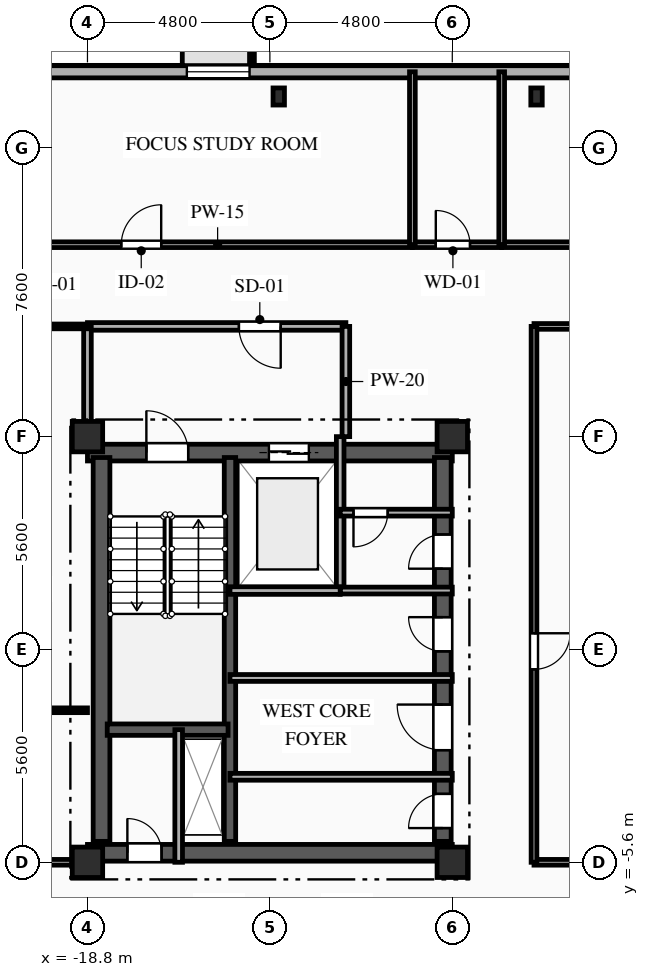
"""IFC4 building model, lengths in metres.
Left out: names, types, materials, properties, quantities, classifications, styles, units other than length and angle.
Written with IfcOpenShell. Run it as: python <this file> out.ifc"""

import sys

from ifc_helpers import new_model, si_unit, direction, frame, frame_2d, origin, origin_2d, place, context, subcontext, project, spatial, rectangle, i_section, extrude, element, fill, save


model = new_model("IFC4")
c1 = context("Model", 3, precision=1e-05, world=origin(), true_north=direction((0.0, 1.0)))
c2 = subcontext(c1, "Body", "Model", "MODEL_VIEW")
j1 = project(units=[si_unit("LENGTHUNIT", "METRE"), si_unit("PLANEANGLEUNIT", "RADIAN")], contexts=[c1])
p1 = place(None, origin())
s1 = spatial("IfcSite", under=j1, at=p1, CompositionType="ELEMENT")
p2 = place(p1, origin())
s2 = spatial("IfcBuilding", under=s1, at=p2, CompositionType="ELEMENT")
p3 = place(p2, frame((0.0, 0.0, 231.65)))
s3 = spatial("IfcBuildingStorey", under=s2, at=p3, CompositionType="ELEMENT", Elevation=231.65)
for number, where, z_axis, x_axis in (
    (1, (-18.8, -5.6, 0.0), (0.0, 0.0, 1.0), (1.0, 0.0, 0.0)),
    (2, (-18.8, 5.6, 0.0), (0.0, 0.0, 1.0), (1.0, 0.0, 0.0)),
    (3, (-9.2, -5.6, 0.0), (0.0, 0.0, 1.0), (1.0, 0.0, 0.0)),
    (4, (-9.2, 5.6, 0.0), (0.0, 0.0, 1.0), (1.0, 0.0, 0.0)),
):
    element("IfcColumn", number, at=place(p3, frame(where, z_axis=z_axis, x_axis=x_axis)), inside=s3, PredefinedType="COLUMN", context=c2, shape_type="SweptSolid", body=[
        extrude(rectangle(XDim=0.8, YDim=0.8, at=origin_2d()), origin(), (0.0, 0.0, 1.0), 3.35),
    ])
for number, where, z_axis, x_axis in (
    (5, (-6.983, 14.55, 0.0), (0.0, 0.0, 1.0), (1.0, 0.0, 0.0)),
    (6, (-13.767, 14.55, 0.0), (0.0, 0.0, 1.0), (1.0, 0.0, 0.0)),
):
    element("IfcColumn", number, at=place(p3, frame(where, z_axis=z_axis, x_axis=x_axis)), inside=s3, PredefinedType="COLUMN", context=c2, shape_type="SweptSolid", body=[
        extrude(i_section(OverallWidth=0.3, OverallDepth=0.45, WebThickness=0.014, FlangeThickness=0.026, FilletRadius=0.027, at=origin_2d()), origin(), (0.0, 0.0, 1.0), 3.35),
    ])
p4 = place(p3, frame((-21.2, 15.2, 0.0), z_axis=(0.0, 0.0, 1.0), x_axis=(1.0, 0.0, 0.0)))
e7 = element("IfcWall", 7, at=p4, inside=s3, PredefinedType="SOLIDWALL", context=c2, shape_type="SweptSolid", body=[
    extrude(rectangle(XDim=42.0, YDim=0.32, at=frame_2d((21.0, 0.0))), origin(), (0.0, 0.0, 1.0), 3.04),
])
p5 = place(p4, frame((5.015, 0.0, 0.85)))
e8 = element("IfcOpeningElement", 8, at=p5, cuts=e7, PredefinedType="OPENING", context=c2, shape_type="SweptSolid", body=[
    extrude(rectangle(XDim=1.65, YDim=1.85, at=frame_2d((0.825, 0.925))), frame((0.0, 0.17, 0.0), z_axis=(0.0, -1.0, 0.0), x_axis=(1.0, 0.0, 0.0)), (0.0, 0.0, 1.0), 0.34),
])
p6 = place(p4, frame((16.48, 0.0, 0.85)))
e9 = element("IfcOpeningElement", 9, at=p6, cuts=e7, PredefinedType="OPENING", context=c2, shape_type="SweptSolid", body=[
    extrude(rectangle(XDim=1.6, YDim=1.85, at=frame_2d((0.8, 0.925))), frame((0.0, 0.17, 0.0), z_axis=(0.0, -1.0, 0.0), x_axis=(1.0, 0.0, 0.0)), (0.0, 0.0, 1.0), 0.34),
])
p7 = place(p4, frame((25.575, 0.0, 0.85)))
e10 = element("IfcOpeningElement", 10, at=p7, cuts=e7, PredefinedType="OPENING", context=c2, shape_type="SweptSolid", body=[
    extrude(rectangle(XDim=1.65, YDim=1.85, at=frame_2d((0.825, 0.925))), frame((0.0, 0.17, 0.0), z_axis=(0.0, -1.0, 0.0), x_axis=(1.0, 0.0, 0.0)), (0.0, 0.0, 1.0), 0.34),
])
p8 = place(p4, frame((35.735, 0.0, 0.85)))
e11 = element("IfcOpeningElement", 11, at=p8, cuts=e7, PredefinedType="OPENING", context=c2, shape_type="SweptSolid", body=[
    extrude(rectangle(XDim=1.65, YDim=1.85, at=frame_2d((0.825, 0.925))), frame((0.0, 0.17, 0.0), z_axis=(0.0, -1.0, 0.0), x_axis=(1.0, 0.0, 0.0)), (0.0, 0.0, 1.0), 0.34),
])
p9 = place(p3, frame((-18.8, 5.18, 0.0), z_axis=(0.0, 0.0, 1.0), x_axis=(1.0, 0.0, 0.0)))
e12 = element("IfcWall", 12, at=p9, inside=s3, PredefinedType="SHEAR", context=c2, shape_type="SweptSolid", body=[
    extrude(rectangle(XDim=9.6, YDim=0.44, at=frame_2d((4.8, 0.0))), origin(), (0.0, 0.0, 1.0), 3.04),
])
p10 = place(p9, frame((1.55, 0.0, 0.0)))
e13 = element("IfcOpeningElement", 13, at=p10, cuts=e12, PredefinedType="OPENING", context=c2, shape_type="SweptSolid", body=[
    extrude(rectangle(XDim=1.1, YDim=2.15, at=frame_2d((0.55, 1.075))), frame((0.0, 0.23, 0.0), z_axis=(0.0, -1.0, 0.0), x_axis=(1.0, 0.0, 0.0)), (0.0, 0.0, 1.0), 0.46),
])
p11 = place(p9, frame((4.775, 0.0, 0.0)))
e14 = element("IfcOpeningElement", 14, at=p11, cuts=e12, PredefinedType="OPENING", context=c2, shape_type="SweptSolid", body=[
    extrude(rectangle(XDim=1.05, YDim=2.1, at=frame_2d((0.525, 1.05))), frame((0.0, 0.23, 0.0), z_axis=(0.0, -1.0, 0.0), x_axis=(1.0, 0.0, 0.0)), (0.0, 0.0, 1.0), 0.46),
])
p12 = place(p3, frame((-18.8, -5.35, 0.0), z_axis=(0.0, 0.0, 1.0), x_axis=(1.0, 0.0, 0.0)))
e15 = element("IfcWall", 15, at=p12, inside=s3, PredefinedType="SHEAR", context=c2, shape_type="SweptSolid", body=[
    extrude(rectangle(XDim=9.6, YDim=0.44, at=frame_2d((4.8, 0.0))), origin(), (0.0, 0.0, 1.0), 3.04),
])
p13 = place(p12, frame((1.05, 0.0, 0.0)))
e16 = element("IfcOpeningElement", 16, at=p13, cuts=e15, PredefinedType="OPENING", context=c2, shape_type="SweptSolid", body=[
    extrude(rectangle(XDim=0.9, YDim=2.1, at=frame_2d((0.45, 1.05))), frame((0.0, 0.23, 0.0), z_axis=(0.0, -1.0, 0.0), x_axis=(1.0, 0.0, 0.0)), (0.0, 0.0, 1.0), 0.46),
])
p14 = place(p3, frame((-18.43, -5.05, 0.0), z_axis=(0.0, 0.0, 1.0), x_axis=(0.0, 1.0, 0.0)))
e17 = element("IfcWall", 17, at=p14, inside=s3, PredefinedType="SHEAR", context=c2, shape_type="SweptSolid", body=[
    extrude(rectangle(XDim=10.1, YDim=0.44, at=frame_2d((5.05, 0.0))), origin(), (0.0, 0.0, 1.0), 3.04),
])
p15 = place(p3, frame((-9.45, -5.05, 0.0), z_axis=(0.0, 0.0, 1.0), x_axis=(0.0, 1.0, 0.0)))
e18 = element("IfcWall", 18, at=p15, inside=s3, PredefinedType="SHEAR", context=c2, shape_type="SweptSolid", body=[
    extrude(rectangle(XDim=10.1, YDim=0.44, at=frame_2d((5.05, 0.0))), origin(), (0.0, 0.0, 1.0), 3.04),
])
p16 = place(p15, frame((7.175, 0.0, 0.0)))
e19 = element("IfcOpeningElement", 19, at=p16, cuts=e18, PredefinedType="OPENING", context=c2, shape_type="SweptSolid", body=[
    extrude(rectangle(XDim=0.9, YDim=2.1, at=frame_2d((0.45, 1.05))), frame((0.0, 0.23, 0.0), z_axis=(0.0, -1.0, 0.0), x_axis=(1.0, 0.0, 0.0)), (0.0, 0.0, 1.0), 0.46),
])
p17 = place(p15, frame((2.4, 0.0, 0.0)))
e20 = element("IfcOpeningElement", 20, at=p17, cuts=e18, PredefinedType="OPENING", context=c2, shape_type="SweptSolid", body=[
    extrude(rectangle(XDim=1.2, YDim=2.15, at=frame_2d((0.6, 1.075))), frame((0.0, 0.23, 0.0), z_axis=(0.0, -1.0, 0.0), x_axis=(1.0, 0.0, 0.0)), (0.0, 0.0, 1.0), 0.46),
])
p18 = place(p15, frame((0.35, 0.0, 0.0)))
e21 = element("IfcOpeningElement", 21, at=p18, cuts=e18, PredefinedType="OPENING", context=c2, shape_type="SweptSolid", body=[
    extrude(rectangle(XDim=0.9, YDim=2.1, at=frame_2d((0.45, 1.05))), frame((0.0, 0.23, 0.0), z_axis=(0.0, -1.0, 0.0), x_axis=(1.0, 0.0, 0.0)), (0.0, 0.0, 1.0), 0.46),
])
p19 = place(p15, frame((5.0, 0.0, 0.0)))
e22 = element("IfcOpeningElement", 22, at=p19, cuts=e18, PredefinedType="OPENING", context=c2, shape_type="SweptSolid", body=[
    extrude(rectangle(XDim=0.9, YDim=2.1, at=frame_2d((0.45, 1.05))), frame((0.0, 0.23, 0.0), z_axis=(0.0, -1.0, 0.0), x_axis=(1.0, 0.0, 0.0)), (0.0, 0.0, 1.0), 0.46),
])
p20 = place(p3, frame((-15.05, -5.05, 0.0), z_axis=(0.0, 0.0, 1.0), x_axis=(0.0, 1.0, 0.0)))
e23 = element("IfcWall", 23, at=p20, inside=s3, PredefinedType="SHEAR", context=c2, shape_type="SweptSolid", body=[
    extrude(rectangle(XDim=10.1, YDim=0.3, at=frame_2d((5.05, 0.0))), origin(), (0.0, 0.0, 1.0), 3.04),
])
p21 = place(p3, frame((-18.28, -2.11, 0.0), z_axis=(0.0, 0.0, 1.0), x_axis=(1.0, 0.0, 0.0)))
e24 = element("IfcWall", 24, at=p21, inside=s3, PredefinedType="SHEAR", context=c2, shape_type="SweptSolid", body=[
    extrude(rectangle(XDim=3.18, YDim=0.3, at=frame_2d((1.59, 0.0))), origin(), (0.0, 0.0, 1.0), 3.04),
])
p22 = place(p3, frame((-16.4, -5.6, 0.0), z_axis=(0.0, 0.0, 1.0), x_axis=(0.0, 1.0, 0.0)))
e25 = element("IfcWall", 25, at=p22, inside=s3, PredefinedType="PARTITIONING", context=c2, shape_type="SweptSolid", body=[
    extrude(rectangle(XDim=3.49, YDim=0.2, at=frame_2d((1.745, 0.0))), origin(), (0.0, 0.0, 1.0), 3.04),
])
p23 = place(p3, frame((-12.15, 1.55, 0.0), z_axis=(0.0, 0.0, 1.0), x_axis=(0.0, 1.0, 0.0)))
e26 = element("IfcWall", 26, at=p23, inside=s3, PredefinedType="PARTITIONING", context=c2, shape_type="SweptSolid", body=[
    extrude(rectangle(XDim=2.05, YDim=0.2, at=frame_2d((1.025, 0.0))), origin(), (0.0, 0.0, 1.0), 3.04),
])
p24 = place(p3, frame((-12.15, 3.6, 0.0), z_axis=(0.0, 0.0, 1.0), x_axis=(0.0, 1.0, 0.0)))
e27 = element("IfcWall", 27, at=p24, inside=s3, PredefinedType="PARTITIONING", context=c2, shape_type="SweptSolid", body=[
    extrude(rectangle(XDim=2.0, YDim=0.2, at=frame_2d((1.0, 0.0))), origin(), (0.0, 0.0, 1.0), 3.04),
])
p25 = place(p3, frame((-12.0, 8.5, 0.0), z_axis=(0.0, 0.0, 1.0), x_axis=(-1.0, 0.0, 0.0)))
e28 = element("IfcWall", 28, at=p25, inside=s3, PredefinedType="PARTITIONING", context=c2, shape_type="SweptSolid", body=[
    extrude(rectangle(XDim=6.8, YDim=0.2, at=frame_2d((3.4, 0.0))), origin(), (0.0, 0.0, 1.0), 3.04),
])
p26 = place(p25, frame((1.715, 0.0, 0.0)))
e29 = element("IfcOpeningElement", 29, at=p26, cuts=e28, PredefinedType="OPENING", context=c2, shape_type="SweptSolid", body=[
    extrude(rectangle(XDim=1.1, YDim=2.15, at=frame_2d((0.55, 1.075))), frame((0.0, 0.11, 0.0), z_axis=(0.0, -1.0, 0.0), x_axis=(1.0, 0.0, 0.0)), (0.0, 0.0, 1.0), 0.22),
])
p27 = place(p3, frame((-12.0, 5.6, 0.0), z_axis=(0.0, 0.0, 1.0), x_axis=(0.0, 1.0, 0.0)))
e30 = element("IfcWall", 30, at=p27, inside=s3, PredefinedType="PARTITIONING", context=c2, shape_type="SweptSolid", body=[
    extrude(rectangle(XDim=2.9, YDim=0.2, at=frame_2d((1.45, 0.0))), origin(), (0.0, 0.0, 1.0), 3.04),
])
p28 = place(p3, frame((-18.8, 8.5, 0.0), z_axis=(0.0, 0.0, 1.0), x_axis=(0.0, -1.0, 0.0)))
e31 = element("IfcWall", 31, at=p28, inside=s3, PredefinedType="PARTITIONING", context=c2, shape_type="SweptSolid", body=[
    extrude(rectangle(XDim=2.9, YDim=0.2, at=frame_2d((1.45, 0.0))), origin(), (0.0, 0.0, 1.0), 2.665),
])
p29 = place(p3, frame((-9.2, 3.6, 0.0), z_axis=(0.0, 0.0, 1.0), x_axis=(-1.0, 0.0, 0.0)))
e32 = element("IfcWall", 32, at=p29, inside=s3, PredefinedType="PARTITIONING", context=c2, shape_type="SweptSolid", body=[
    extrude(rectangle(XDim=2.95, YDim=0.18, at=frame_2d((1.475, 0.0))), origin(), (0.0, 0.0, 1.0), 3.04),
])
p30 = place(p29, frame((1.7, 0.0, 0.0)))
e33 = element("IfcOpeningElement", 33, at=p30, cuts=e32, PredefinedType="OPENING", context=c2, shape_type="SweptSolid", body=[
    extrude(rectangle(XDim=0.9, YDim=2.1, at=frame_2d((0.45, 1.05))), frame((0.0, 0.1, 0.0), z_axis=(0.0, -1.0, 0.0), x_axis=(1.0, 0.0, 0.0)), (0.0, 0.0, 1.0), 0.2),
])
p31 = place(p3, frame((-12.15, 1.55, 0.0), z_axis=(0.0, 0.0, 1.0), x_axis=(1.0, 0.0, 0.0)))
e34 = element("IfcWall", 34, at=p31, inside=s3, PredefinedType="PARTITIONING", context=c2, shape_type="SweptSolid", body=[
    extrude(rectangle(XDim=2.95, YDim=0.18, at=frame_2d((1.475, 0.0))), origin(), (0.0, 0.0, 1.0), 3.04),
])
p32 = place(p3, frame((-15.05, -3.35, 0.0), z_axis=(0.0, 0.0, 1.0), x_axis=(1.0, 0.0, 0.0)))
e35 = element("IfcWall", 35, at=p32, inside=s3, PredefinedType="PARTITIONING", context=c2, shape_type="SweptSolid", body=[
    extrude(rectangle(XDim=5.85, YDim=0.18, at=frame_2d((2.925, 0.0))), origin(), (0.0, 0.0, 1.0), 2.755),
])
p33 = place(p3, frame((-9.2, -0.75, 0.0), z_axis=(0.0, 0.0, 1.0), x_axis=(-1.0, 0.0, 0.0)))
e36 = element("IfcWall", 36, at=p33, inside=s3, PredefinedType="PARTITIONING", context=c2, shape_type="SweptSolid", body=[
    extrude(rectangle(XDim=5.85, YDim=0.18, at=frame_2d((2.925, 0.0))), origin(), (0.0, 0.0, 1.0), 3.04),
])
p34 = place(p3, frame((-18.8, 8.5, 0.0), z_axis=(0.0, 0.0, 1.0), x_axis=(-1.0, 0.0, 0.0)))
e37 = element("IfcWall", 37, at=p34, inside=s3, PredefinedType="PARTITIONING", context=c2, shape_type="SweptSolid", body=[
    extrude(rectangle(XDim=1.7, YDim=0.125, at=frame_2d((0.85, 0.0))), origin(), (0.0, 0.0, 1.0), 3.04),
])
p35 = place(p3, frame((-20.5, 10.65, 0.0), z_axis=(0.0, 0.0, 1.0), x_axis=(1.0, 0.0, 0.0)))
e38 = element("IfcWall", 38, at=p35, inside=s3, PredefinedType="PARTITIONING", context=c2, shape_type="SweptSolid", body=[
    extrude(rectangle(XDim=10.25, YDim=0.15, at=frame_2d((5.125, 0.0))), origin(), (0.0, 0.0, 1.0), 3.04),
])
p36 = place(p35, frame((2.59, 0.0, 0.0)))
e39 = element("IfcOpeningElement", 39, at=p36, cuts=e38, PredefinedType="OPENING", context=c2, shape_type="SweptSolid", body=[
    extrude(rectangle(XDim=1.05, YDim=2.15, at=frame_2d((0.525, 1.075))), frame((0.0, 0.085, 0.0), z_axis=(0.0, -1.0, 0.0), x_axis=(1.0, 0.0, 0.0)), (0.0, 0.0, 1.0), 0.17),
])
p37 = place(p3, frame((-10.25, 10.65, 0.0), z_axis=(0.0, 0.0, 1.0), x_axis=(1.0, 0.0, 0.0)))
e40 = element("IfcWall", 40, at=p37, inside=s3, PredefinedType="PLUMBINGWALL", context=c2, shape_type="SweptSolid", body=[
    extrude(rectangle(XDim=2.35, YDim=0.15, at=frame_2d((1.175, 0.0))), origin(), (0.0, 0.0, 1.0), 3.04),
])
p38 = place(p37, frame((0.616, 0.0, 0.0)))
e41 = element("IfcOpeningElement", 41, at=p38, cuts=e40, PredefinedType="OPENING", context=c2, shape_type="SweptSolid", body=[
    extrude(rectangle(XDim=0.9, YDim=2.1, at=frame_2d((0.45, 1.05))), frame((0.0, 0.085, 0.0), z_axis=(0.0, -1.0, 0.0), x_axis=(1.0, 0.0, 0.0)), (0.0, 0.0, 1.0), 0.17),
])
p39 = place(p3, frame((-7.9, 10.65, 0.0), z_axis=(0.0, 0.0, 1.0), x_axis=(1.0, 0.0, 0.0)))
e42 = element("IfcWall", 42, at=p39, inside=s3, PredefinedType="PARTITIONING", context=c2, shape_type="SweptSolid", body=[
    extrude(rectangle(XDim=7.9, YDim=0.15, at=frame_2d((3.95, 0.0))), origin(), (0.0, 0.0, 1.0), 3.04),
])
p40 = place(p39, frame((3.475, 0.0, 0.0)))
e43 = element("IfcOpeningElement", 43, at=p40, cuts=e42, PredefinedType="OPENING", context=c2, shape_type="SweptSolid", body=[
    extrude(rectangle(XDim=0.95, YDim=2.1, at=frame_2d((0.475, 1.05))), frame((0.0, 0.085, 0.0), z_axis=(0.0, -1.0, 0.0), x_axis=(1.0, 0.0, 0.0)), (0.0, 0.0, 1.0), 0.17),
])
p41 = place(p3, frame((0.0, 8.5, 0.0), z_axis=(0.0, 0.0, 1.0), x_axis=(-1.0, 0.0, 0.0)))
e44 = element("IfcWall", 44, at=p41, inside=s3, PredefinedType="PARTITIONING", context=c2, shape_type="SweptSolid", body=[
    extrude(rectangle(XDim=7.05, YDim=0.15, at=frame_2d((3.525, 0.0))), origin(), (0.0, 0.0, 1.0), 3.04),
])
p42 = place(p3, frame((-20.5, -5.6, 0.0), z_axis=(0.0, 0.0, 1.0), x_axis=(1.0, 0.0, 0.0)))
e45 = element("IfcWall", 45, at=p42, inside=s3, PredefinedType="PARTITIONING", context=c2, shape_type="SweptSolid", body=[
    extrude(rectangle(XDim=1.7, YDim=0.15, at=frame_2d((0.85, 0.0))), origin(), (0.0, 0.0, 1.0), 3.04),
])
p43 = place(p3, frame((-7.05, -5.6, 0.0), z_axis=(0.0, 0.0, 1.0), x_axis=(1.0, 0.0, 0.0)))
e46 = element("IfcWall", 46, at=p43, inside=s3, PredefinedType="PARTITIONING", context=c2, shape_type="SweptSolid", body=[
    extrude(rectangle(XDim=7.05, YDim=0.15, at=frame_2d((3.525, 0.0))), origin(), (0.0, 0.0, 1.0), 2.525),
])
p44 = place(p3, frame((-7.05, 8.5, 0.0), z_axis=(0.0, 0.0, 1.0), x_axis=(0.0, -1.0, 0.0)))
e47 = element("IfcWall", 47, at=p44, inside=s3, PredefinedType="PARTITIONING", context=c2, shape_type="SweptSolid", body=[
    extrude(rectangle(XDim=14.1, YDim=0.15, at=frame_2d((7.05, 0.0))), origin(), (0.0, 0.0, 1.0), 3.04),
])
p45 = place(p44, frame((8.074, 0.0, 0.0)))
e48 = element("IfcOpeningElement", 48, at=p45, cuts=e47, PredefinedType="OPENING", context=c2, shape_type="SweptSolid", body=[
    extrude(rectangle(XDim=0.95, YDim=2.1, at=frame_2d((0.475, 1.05))), frame((0.0, 0.085, 0.0), z_axis=(0.0, -1.0, 0.0), x_axis=(1.0, 0.0, 0.0)), (0.0, 0.0, 1.0), 0.17),
])
p46 = place(p3, frame((-24.0, -1.6, 0.0), z_axis=(0.0, 0.0, 1.0), x_axis=(1.0, 0.0, 0.0)))
e49 = element("IfcWall", 49, at=p46, inside=s3, PredefinedType="PARTITIONING", context=c2, shape_type="SweptSolid", body=[
    extrude(rectangle(XDim=5.2, YDim=0.125, at=frame_2d((2.6, 0.0))), origin(), (0.0, 0.0, 1.0), 3.04),
])
p47 = place(p3, frame((-10.25, 15.2, 0.0), z_axis=(0.0, 0.0, 1.0), x_axis=(0.0, -1.0, 0.0)))
e50 = element("IfcWall", 50, at=p47, inside=s3, PredefinedType="PLUMBINGWALL", context=c2, shape_type="SweptSolid", body=[
    extrude(rectangle(XDim=4.55, YDim=0.15, at=frame_2d((2.275, 0.0))), origin(), (0.0, 0.0, 1.0), 3.04),
])
p48 = place(p3, frame((-7.9, 15.2, 0.0), z_axis=(0.0, 0.0, 1.0), x_axis=(0.0, -1.0, 0.0)))
e51 = element("IfcWall", 51, at=p48, inside=s3, PredefinedType="PLUMBINGWALL", context=c2, shape_type="SweptSolid", body=[
    extrude(rectangle(XDim=4.55, YDim=0.15, at=frame_2d((2.275, 0.0))), origin(), (0.0, 0.0, 1.0), 2.665),
])
p49 = place(p3, frame((-15.05, 1.55, 0.0), z_axis=(0.0, 0.0, 1.0), x_axis=(1.0, 0.0, 0.0)))
e52 = element("IfcWall", 52, at=p49, inside=s3, PredefinedType="PARTITIONING", context=c2, shape_type="SweptSolid", body=[
    extrude(rectangle(XDim=2.9, YDim=0.2, at=frame_2d((1.45, 0.0))), origin(), (0.0, 0.0, 1.0), 3.04),
])
p50 = place(p5, origin())
e53 = element("IfcWindow", 53, at=p50, inside=s3, PartitioningType="SINGLE_PANEL", PredefinedType="WINDOW", context=c2, shape_type="SweptSolid", body=[
    extrude(rectangle(XDim=1.65, YDim=1.85, at=frame_2d((0.825, 0.925))), frame((0.0, 0.03, 0.0), z_axis=(0.0, -1.0, 0.0), x_axis=(1.0, 0.0, 0.0)), (0.0, 0.0, 1.0), 0.06),
])
fill(e8, e53)
p51 = place(p10, origin())
e54 = element("IfcDoor", 54, at=p51, inside=s3, OperationType="SINGLE_SWING_LEFT", PredefinedType="DOOR", context=c2, shape_type="SweptSolid", body=[
    extrude(rectangle(XDim=1.1, YDim=2.15, at=frame_2d((0.55, 1.075))), frame((0.0, 0.025, 0.0), z_axis=(0.0, -1.0, 0.0), x_axis=(1.0, 0.0, 0.0)), (0.0, 0.0, 1.0), 0.05),
])
fill(e13, e54)
p52 = place(p11, origin())
e55 = element("IfcDoor", 55, at=p52, inside=s3, OperationType="DOUBLE_DOOR_SLIDING", PredefinedType="DOOR", context=c2, shape_type="SweptSolid", body=[
    extrude(rectangle(XDim=1.05, YDim=2.1, at=frame_2d((0.525, 1.05))), frame((0.0, 0.025, 0.0), z_axis=(0.0, -1.0, 0.0), x_axis=(1.0, 0.0, 0.0)), (0.0, 0.0, 1.0), 0.05),
])
fill(e14, e55)
p53 = place(p13, origin())
e56 = element("IfcDoor", 56, at=p53, inside=s3, OperationType="SINGLE_SWING_LEFT", PredefinedType="DOOR", context=c2, shape_type="SweptSolid", body=[
    extrude(rectangle(XDim=0.9, YDim=2.1, at=frame_2d((0.45, 1.05))), frame((0.0, 0.025, 0.0), z_axis=(0.0, -1.0, 0.0), x_axis=(1.0, 0.0, 0.0)), (0.0, 0.0, 1.0), 0.05),
])
fill(e16, e56)
p54 = place(p26, origin())
e57 = element("IfcDoor", 57, at=p54, inside=s3, OperationType="SINGLE_SWING_LEFT", PredefinedType="DOOR", context=c2, shape_type="SweptSolid", body=[
    extrude(rectangle(XDim=1.1, YDim=2.15, at=frame_2d((0.55, 1.075))), frame((0.0, 0.025, 0.0), z_axis=(0.0, -1.0, 0.0), x_axis=(1.0, 0.0, 0.0)), (0.0, 0.0, 1.0), 0.05),
])
fill(e29, e57)
p55 = place(p30, origin())
e58 = element("IfcDoor", 58, at=p55, inside=s3, OperationType="SINGLE_SWING_RIGHT", PredefinedType="DOOR", context=c2, shape_type="SweptSolid", body=[
    extrude(rectangle(XDim=0.9, YDim=2.1, at=frame_2d((0.45, 1.05))), frame((0.0, 0.025, 0.0), z_axis=(0.0, -1.0, 0.0), x_axis=(1.0, 0.0, 0.0)), (0.0, 0.0, 1.0), 0.05),
])
fill(e33, e58)
p56 = place(p16, origin())
e59 = element("IfcDoor", 59, at=p56, inside=s3, OperationType="SINGLE_SWING_LEFT", PredefinedType="DOOR", context=c2, shape_type="SweptSolid", body=[
    extrude(rectangle(XDim=0.9, YDim=2.1, at=frame_2d((0.45, 1.05))), frame((0.0, 0.025, 0.0), z_axis=(0.0, -1.0, 0.0), x_axis=(1.0, 0.0, 0.0)), (0.0, 0.0, 1.0), 0.05),
])
fill(e19, e59)
p57 = place(p17, origin())
e60 = element("IfcDoor", 60, at=p57, inside=s3, OperationType="SINGLE_SWING_RIGHT", PredefinedType="DOOR", context=c2, shape_type="SweptSolid", body=[
    extrude(rectangle(XDim=1.2, YDim=2.15, at=frame_2d((0.6, 1.075))), frame((0.0, 0.025, 0.0), z_axis=(0.0, -1.0, 0.0), x_axis=(1.0, 0.0, 0.0)), (0.0, 0.0, 1.0), 0.05),
])
fill(e20, e60)
p58 = place(p18, origin())
e61 = element("IfcDoor", 61, at=p58, inside=s3, OperationType="SINGLE_SWING_LEFT", PredefinedType="DOOR", context=c2, shape_type="SweptSolid", body=[
    extrude(rectangle(XDim=0.9, YDim=2.1, at=frame_2d((0.45, 1.05))), frame((0.0, 0.025, 0.0), z_axis=(0.0, -1.0, 0.0), x_axis=(1.0, 0.0, 0.0)), (0.0, 0.0, 1.0), 0.05),
])
fill(e21, e61)
p59 = place(p19, origin())
e62 = element("IfcDoor", 62, at=p59, inside=s3, OperationType="SINGLE_SWING_RIGHT", PredefinedType="DOOR", context=c2, shape_type="SweptSolid", body=[
    extrude(rectangle(XDim=0.9, YDim=2.1, at=frame_2d((0.45, 1.05))), frame((0.0, 0.025, 0.0), z_axis=(0.0, -1.0, 0.0), x_axis=(1.0, 0.0, 0.0)), (0.0, 0.0, 1.0), 0.05),
])
fill(e22, e62)
p60 = place(p36, origin())
e63 = element("IfcDoor", 63, at=p60, inside=s3, OperationType="SINGLE_SWING_RIGHT", PredefinedType="DOOR", context=c2, shape_type="SweptSolid", body=[
    extrude(rectangle(XDim=1.05, YDim=2.15, at=frame_2d((0.525, 1.075))), frame((0.0, 0.025, 0.0), z_axis=(0.0, -1.0, 0.0), x_axis=(1.0, 0.0, 0.0)), (0.0, 0.0, 1.0), 0.05),
])
fill(e39, e63)
p61 = place(p38, origin())
e64 = element("IfcDoor", 64, at=p61, inside=s3, OperationType="SINGLE_SWING_LEFT", PredefinedType="DOOR", context=c2, shape_type="SweptSolid", body=[
    extrude(rectangle(XDim=0.9, YDim=2.1, at=frame_2d((0.45, 1.05))), frame((0.0, 0.025, 0.0), z_axis=(0.0, -1.0, 0.0), x_axis=(1.0, 0.0, 0.0)), (0.0, 0.0, 1.0), 0.05),
])
fill(e41, e64)
p62 = place(p45, origin())
e65 = element("IfcDoor", 65, at=p62, inside=s3, OperationType="SINGLE_SWING_LEFT", PredefinedType="DOOR", context=c2, shape_type="SweptSolid", body=[
    extrude(rectangle(XDim=0.95, YDim=2.1, at=frame_2d((0.475, 1.05))), frame((0.0, 0.025, 0.0), z_axis=(0.0, -1.0, 0.0), x_axis=(1.0, 0.0, 0.0)), (0.0, 0.0, 1.0), 0.05),
])
fill(e48, e65)
save(model, sys.argv[1])
